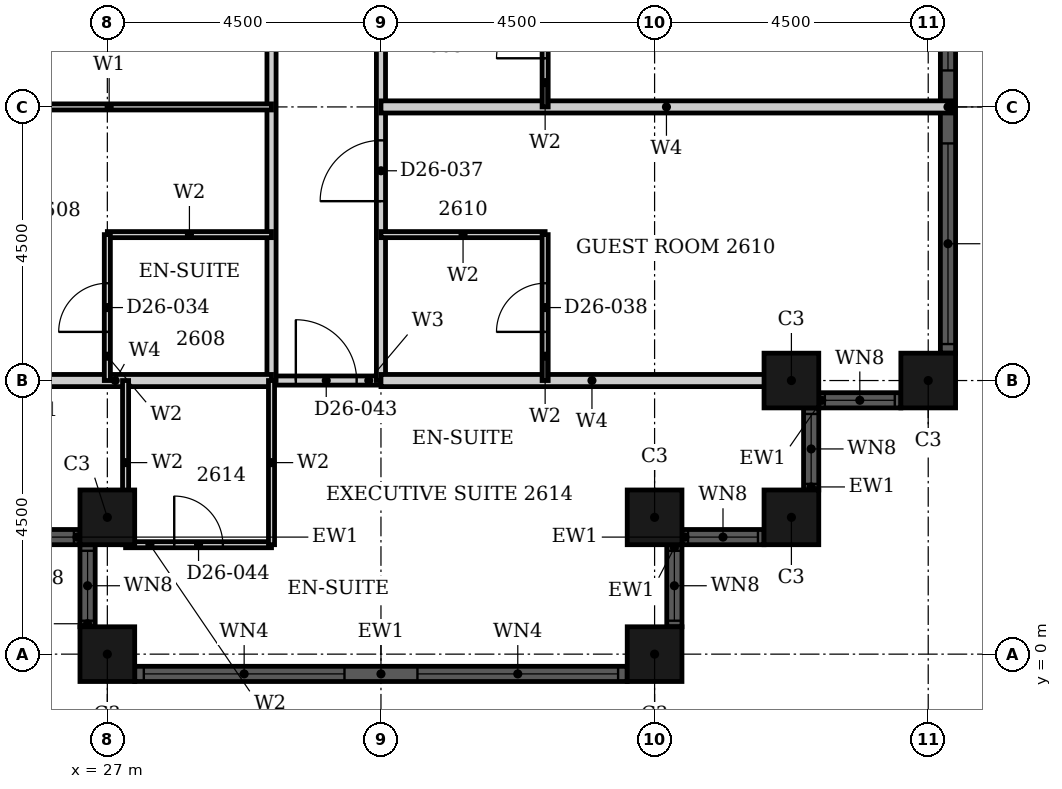
"""IFC4 building model, lengths in metres.
Left out: names, types, materials, properties, quantities, classifications, styles, units other than length and angle.
Written with IfcOpenShell. Run it as: python <this file> out.ifc"""

import sys

from ifc_helpers import new_model, si_unit, direction, frame, frame_2d, origin, origin_2d, place, context, subcontext, project, spatial, rectangle, hollow_rectangle, extrude, element, fill, save


model = new_model("IFC4")
c1 = context("Model", 3, precision=1e-05, world=origin(), true_north=direction((0.0, 1.0)))
c2 = subcontext(c1, "Body", "Model", "MODEL_VIEW")
j1 = project(units=[si_unit("LENGTHUNIT", "METRE"), si_unit("PLANEANGLEUNIT", "RADIAN")], contexts=[c1])
p1 = place(None, origin())
s1 = spatial("IfcSite", under=j1, at=p1, CompositionType="ELEMENT")
p2 = place(p1, origin())
s2 = spatial("IfcBuilding", under=s1, at=p2, CompositionType="ELEMENT")
p3 = place(p2, frame((0.0, 0.0, 108.0)))
s3 = spatial("IfcBuildingStorey", under=s2, at=p3, CompositionType="ELEMENT", Elevation=108.0)
for number, where, z_axis, x_axis in (
    (1, (27.0, 2.25, 0.0), (0.0, 0.0, 1.0), (1.0, 0.0, 0.0)),
    (2, (27.0, 0.0, 0.0), (0.0, 0.0, 1.0), (1.0, 0.0, 0.0)),
    (3, (36.0, 0.0, 0.0), (0.0, 0.0, 1.0), (1.0, 0.0, 0.0)),
    (4, (36.0, 2.25, 0.0), (0.0, 0.0, 1.0), (1.0, 0.0, 0.0)),
    (5, (38.25, 2.25, 0.0), (0.0, 0.0, 1.0), (1.0, 0.0, 0.0)),
    (6, (38.25, 4.5, 0.0), (0.0, 0.0, 1.0), (1.0, 0.0, 0.0)),
    (7, (40.5, 4.5, 0.0), (0.0, 0.0, 1.0), (1.0, 0.0, 0.0)),
):
    element("IfcColumn", number, at=place(p3, frame(where, z_axis=z_axis, x_axis=x_axis)), inside=s3, PredefinedType="COLUMN", context=c2, shape_type="SweptSolid", body=[
        extrude(hollow_rectangle(XDim=0.9, YDim=0.9, WallThickness=0.028, at=origin_2d()), origin(), (0.0, 0.0, 1.0), 3.6),
    ])
p4 = place(p3, frame((25.2, 1.925, 0.0), z_axis=(0.0, 0.0, 1.0), x_axis=(1.0, 0.0, 0.0)))
e8 = element("IfcWall", 8, at=p4, inside=s3, PredefinedType="SOLIDWALL", context=c2, shape_type="SweptSolid", body=[
    extrude(rectangle(XDim=1.35, YDim=0.25, at=frame_2d((0.675, 0.0))), origin(), (0.0, 0.0, 1.0), 3.6),
])
p5 = place(p4, frame((0.1, 0.0, 0.9)))
e9 = element("IfcOpeningElement", 9, at=p5, cuts=e8, PredefinedType="OPENING", context=c2, shape_type="SweptSolid", body=[
    extrude(rectangle(XDim=1.15, YDim=2.08, at=frame_2d((0.575, 1.04))), frame((0.0, 0.135, 0.0), z_axis=(0.0, -1.0, 0.0), x_axis=(1.0, 0.0, 0.0)), (0.0, 0.0, 1.0), 0.27),
])
p6 = place(p3, frame((26.675, 1.8, 0.0), z_axis=(0.0, 0.0, 1.0), x_axis=(0.0, -1.0, 0.0)))
e10 = element("IfcWall", 10, at=p6, inside=s3, PredefinedType="SOLIDWALL", context=c2, shape_type="SweptSolid", body=[
    extrude(rectangle(XDim=1.35, YDim=0.25, at=frame_2d((0.675, 0.0))), origin(), (0.0, 0.0, 1.0), 3.6),
])
p7 = place(p6, frame((0.1, 0.0, 0.9)))
e11 = element("IfcOpeningElement", 11, at=p7, cuts=e10, PredefinedType="OPENING", context=c2, shape_type="SweptSolid", body=[
    extrude(rectangle(XDim=1.15, YDim=2.08, at=frame_2d((0.575, 1.04))), frame((0.0, 0.135, 0.0), z_axis=(0.0, -1.0, 0.0), x_axis=(1.0, 0.0, 0.0)), (0.0, 0.0, 1.0), 0.27),
])
p8 = place(p3, frame((27.45, -0.325, 0.0), z_axis=(0.0, 0.0, 1.0), x_axis=(1.0, 0.0, 0.0)))
e12 = element("IfcWall", 12, at=p8, inside=s3, PredefinedType="SOLIDWALL", context=c2, shape_type="SweptSolid", body=[
    extrude(rectangle(XDim=8.1, YDim=0.25, at=frame_2d((4.05, 0.0))), origin(), (0.0, 0.0, 1.0), 3.6),
])
p9 = place(p8, frame((0.15, 0.0, 0.9)))
e13 = element("IfcOpeningElement", 13, at=p9, cuts=e12, PredefinedType="OPENING", context=c2, shape_type="SweptSolid", body=[
    extrude(rectangle(XDim=3.3, YDim=2.08, at=frame_2d((1.65, 1.04))), frame((0.0, 0.135, 0.0), z_axis=(0.0, -1.0, 0.0), x_axis=(1.0, 0.0, 0.0)), (0.0, 0.0, 1.0), 0.27),
])
p10 = place(p8, frame((4.65, 0.0, 0.9)))
e14 = element("IfcOpeningElement", 14, at=p10, cuts=e12, PredefinedType="OPENING", context=c2, shape_type="SweptSolid", body=[
    extrude(rectangle(XDim=3.3, YDim=2.08, at=frame_2d((1.65, 1.04))), frame((0.0, 0.135, 0.0), z_axis=(0.0, -1.0, 0.0), x_axis=(1.0, 0.0, 0.0)), (0.0, 0.0, 1.0), 0.27),
])
p11 = place(p3, frame((36.325, 0.45, 0.0), z_axis=(0.0, 0.0, 1.0), x_axis=(0.0, 1.0, 0.0)))
e15 = element("IfcWall", 15, at=p11, inside=s3, PredefinedType="SOLIDWALL", context=c2, shape_type="SweptSolid", body=[
    extrude(rectangle(XDim=1.35, YDim=0.25, at=frame_2d((0.675, 0.0))), origin(), (0.0, 0.0, 1.0), 3.6),
])
p12 = place(p11, frame((0.1, 0.0, 0.9)))
e16 = element("IfcOpeningElement", 16, at=p12, cuts=e15, PredefinedType="OPENING", context=c2, shape_type="SweptSolid", body=[
    extrude(rectangle(XDim=1.15, YDim=2.08, at=frame_2d((0.575, 1.04))), frame((0.0, 0.135, 0.0), z_axis=(0.0, -1.0, 0.0), x_axis=(1.0, 0.0, 0.0)), (0.0, 0.0, 1.0), 0.27),
])
p13 = place(p3, frame((36.45, 1.925, 0.0), z_axis=(0.0, 0.0, 1.0), x_axis=(1.0, 0.0, 0.0)))
e17 = element("IfcWall", 17, at=p13, inside=s3, PredefinedType="SOLIDWALL", context=c2, shape_type="SweptSolid", body=[
    extrude(rectangle(XDim=1.35, YDim=0.25, at=frame_2d((0.675, 0.0))), origin(), (0.0, 0.0, 1.0), 3.6),
])
p14 = place(p13, frame((0.1, 0.0, 0.9)))
e18 = element("IfcOpeningElement", 18, at=p14, cuts=e17, PredefinedType="OPENING", context=c2, shape_type="SweptSolid", body=[
    extrude(rectangle(XDim=1.15, YDim=2.08, at=frame_2d((0.575, 1.04))), frame((0.0, 0.135, 0.0), z_axis=(0.0, -1.0, 0.0), x_axis=(1.0, 0.0, 0.0)), (0.0, 0.0, 1.0), 0.27),
])
p15 = place(p3, frame((38.575, 2.7, 0.0), z_axis=(0.0, 0.0, 1.0), x_axis=(0.0, 1.0, 0.0)))
e19 = element("IfcWall", 19, at=p15, inside=s3, PredefinedType="SOLIDWALL", context=c2, shape_type="SweptSolid", body=[
    extrude(rectangle(XDim=1.35, YDim=0.25, at=frame_2d((0.675, 0.0))), origin(), (0.0, 0.0, 1.0), 3.6),
])
p16 = place(p15, frame((0.1, 0.0, 0.9)))
e20 = element("IfcOpeningElement", 20, at=p16, cuts=e19, PredefinedType="OPENING", context=c2, shape_type="SweptSolid", body=[
    extrude(rectangle(XDim=1.15, YDim=2.08, at=frame_2d((0.575, 1.04))), frame((0.0, 0.135, 0.0), z_axis=(0.0, -1.0, 0.0), x_axis=(1.0, 0.0, 0.0)), (0.0, 0.0, 1.0), 0.27),
])
p17 = place(p3, frame((38.7, 4.175, 0.0), z_axis=(0.0, 0.0, 1.0), x_axis=(1.0, 0.0, 0.0)))
e21 = element("IfcWall", 21, at=p17, inside=s3, PredefinedType="SOLIDWALL", context=c2, shape_type="SweptSolid", body=[
    extrude(rectangle(XDim=1.35, YDim=0.25, at=frame_2d((0.675, 0.0))), origin(), (0.0, 0.0, 1.0), 3.6),
])
p18 = place(p17, frame((0.1, 0.0, 0.9)))
e22 = element("IfcOpeningElement", 22, at=p18, cuts=e21, PredefinedType="OPENING", context=c2, shape_type="SweptSolid", body=[
    extrude(rectangle(XDim=1.15, YDim=2.08, at=frame_2d((0.575, 1.04))), frame((0.0, 0.135, 0.0), z_axis=(0.0, -1.0, 0.0), x_axis=(1.0, 0.0, 0.0)), (0.0, 0.0, 1.0), 0.27),
])
p19 = place(p3, frame((40.825, 4.95, 0.0), z_axis=(0.0, 0.0, 1.0), x_axis=(0.0, 1.0, 0.0)))
e23 = element("IfcWall", 23, at=p19, inside=s3, PredefinedType="SOLIDWALL", context=c2, shape_type="SweptSolid", body=[
    extrude(rectangle(XDim=8.1, YDim=0.25, at=frame_2d((4.05, 0.0))), origin(), (0.0, 0.0, 1.0), 3.6),
])
p20 = place(p19, frame((0.15, 0.0, 0.9)))
e24 = element("IfcOpeningElement", 24, at=p20, cuts=e23, PredefinedType="OPENING", context=c2, shape_type="SweptSolid", body=[
    extrude(rectangle(XDim=3.3, YDim=2.08, at=frame_2d((1.65, 1.04))), frame((0.0, 0.135, 0.0), z_axis=(0.0, -1.0, 0.0), x_axis=(1.0, 0.0, 0.0)), (0.0, 0.0, 1.0), 0.27),
])
p21 = place(p19, frame((4.65, 0.0, 0.9)))
e25 = element("IfcOpeningElement", 25, at=p21, cuts=e23, PredefinedType="OPENING", context=c2, shape_type="SweptSolid", body=[
    extrude(rectangle(XDim=3.3, YDim=2.08, at=frame_2d((1.65, 1.04))), frame((0.0, 0.135, 0.0), z_axis=(0.0, -1.0, 0.0), x_axis=(1.0, 0.0, 0.0)), (0.0, 0.0, 1.0), 0.27),
])
p22 = place(p3, frame((29.7, 4.5, 0.0), z_axis=(0.0, 0.0, 1.0), x_axis=(1.0, 0.0, 0.0)))
e26 = element("IfcWall", 26, at=p22, inside=s3, PredefinedType="PARTITIONING", context=c2, shape_type="SweptSolid", body=[
    extrude(rectangle(XDim=1.8, YDim=0.15, at=frame_2d((0.9, 0.0))), origin(), (0.0, 0.0, 1.0), 3.3),
])
p23 = place(p22, frame((0.4, 0.0, 0.0)))
e27 = element("IfcOpeningElement", 27, at=p23, cuts=e26, PredefinedType="OPENING", context=c2, shape_type="SweptSolid", body=[
    extrude(rectangle(XDim=1.0, YDim=2.1, at=frame_2d((0.5, 1.05))), frame((0.0, 0.085, 0.0), z_axis=(0.0, -1.0, 0.0), x_axis=(1.0, 0.0, 0.0)), (0.0, 0.0, 1.0), 0.17),
])
p24 = place(p3, frame((29.7, 4.5, 0.0), z_axis=(0.0, 0.0, 1.0), x_axis=(0.0, 1.0, 0.0)))
e28 = element("IfcWall", 28, at=p24, inside=s3, PredefinedType="PARTITIONING", context=c2, shape_type="SweptSolid", body=[
    extrude(rectangle(XDim=16.2, YDim=0.15, at=frame_2d((8.1, 0.0))), origin(), (0.0, 0.0, 1.0), 3.3),
])
p25 = place(p24, frame((6.25, 0.0, 0.0)))
e29 = element("IfcOpeningElement", 29, at=p25, cuts=e28, PredefinedType="OPENING", context=c2, shape_type="SweptSolid", body=[
    extrude(rectangle(XDim=1.0, YDim=2.1, at=frame_2d((0.5, 1.05))), frame((0.0, 0.085, 0.0), z_axis=(0.0, -1.0, 0.0), x_axis=(1.0, 0.0, 0.0)), (0.0, 0.0, 1.0), 0.17),
])
p26 = place(p3, frame((31.5, 4.5, 0.0), z_axis=(0.0, 0.0, 1.0), x_axis=(0.0, 1.0, 0.0)))
e30 = element("IfcWall", 30, at=p26, inside=s3, PredefinedType="PARTITIONING", context=c2, shape_type="SweptSolid", body=[
    extrude(rectangle(XDim=16.2, YDim=0.15, at=frame_2d((8.1, 0.0))), origin(), (0.0, 0.0, 1.0), 2.58),
])
p27 = place(p26, frame((7.45, 0.0, 0.0)))
e31 = element("IfcOpeningElement", 31, at=p27, cuts=e30, PredefinedType="OPENING", context=c2, shape_type="SweptSolid", body=[
    extrude(rectangle(XDim=1.0, YDim=2.1, at=frame_2d((0.5, 1.05))), frame((0.0, 0.085, 0.0), z_axis=(0.0, -1.0, 0.0), x_axis=(1.0, 0.0, 0.0)), (0.0, 0.0, 1.0), 0.17),
])
p28 = place(p26, frame((2.95, 0.0, 0.0)))
e32 = element("IfcOpeningElement", 32, at=p28, cuts=e30, PredefinedType="OPENING", context=c2, shape_type="SweptSolid", body=[
    extrude(rectangle(XDim=1.0, YDim=2.1, at=frame_2d((0.5, 1.05))), frame((0.0, 0.085, 0.0), z_axis=(0.0, -1.0, 0.0), x_axis=(1.0, 0.0, 0.0)), (0.0, 0.0, 1.0), 0.17),
])
p29 = place(p3, frame((22.11, 9.0, 0.0), z_axis=(0.0, 0.0, 1.0), x_axis=(1.0, 0.0, 0.0)))
e33 = element("IfcWall", 33, at=p29, inside=s3, PredefinedType="PARTITIONING", context=c2, shape_type="SweptSolid", body=[
    extrude(rectangle(XDim=7.59, YDim=0.1, at=frame_2d((3.795, 0.0))), origin(), (0.0, 0.0, 1.0), 3.3),
])
p30 = place(p29, frame((1.35, 0.0, 0.0)))
e34 = element("IfcOpeningElement", 34, at=p30, cuts=e33, PredefinedType="OPENING", context=c2, shape_type="SweptSolid", body=[
    extrude(rectangle(XDim=0.9, YDim=2.1, at=frame_2d((0.45, 1.05))), frame((0.0, 0.06, 0.0), z_axis=(0.0, -1.0, 0.0), x_axis=(1.0, 0.0, 0.0)), (0.0, 0.0, 1.0), 0.12),
])
p31 = place(p3, frame((31.5, 4.5, 0.0), z_axis=(0.0, 0.0, 1.0), x_axis=(1.0, 0.0, 0.0)))
e35 = element("IfcWall", 35, at=p31, inside=s3, PredefinedType="PARTITIONING", context=c2, shape_type="SweptSolid", body=[
    extrude(rectangle(XDim=6.94, YDim=0.2, at=frame_2d((3.47, 0.0))), origin(), (0.0, 0.0, 1.0), 3.3),
])
p32 = place(p3, frame((24.56, 4.5, 0.0), z_axis=(0.0, 0.0, 1.0), x_axis=(1.0, 0.0, 0.0)))
e36 = element("IfcWall", 36, at=p32, inside=s3, PredefinedType="PARTITIONING", context=c2, shape_type="SweptSolid", body=[
    extrude(rectangle(XDim=5.14, YDim=0.2, at=frame_2d((2.57, 0.0))), origin(), (0.0, 0.0, 1.0), 3.3),
])
p33 = place(p3, frame((31.5, 9.0, 0.0), z_axis=(0.0, 0.0, 1.0), x_axis=(1.0, 0.0, 0.0)))
e37 = element("IfcWall", 37, at=p33, inside=s3, PredefinedType="PARTITIONING", context=c2, shape_type="SweptSolid", body=[
    extrude(rectangle(XDim=9.39, YDim=0.2, at=frame_2d((4.695, 0.0))), origin(), (0.0, 0.0, 1.0), 3.3),
])
p34 = place(p3, frame((27.3, 1.8, 0.0), z_axis=(0.0, 0.0, 1.0), x_axis=(1.0, 0.0, 0.0)))
e38 = element("IfcWall", 38, at=p34, inside=s3, PredefinedType="PARTITIONING", context=c2, shape_type="SweptSolid", body=[
    extrude(rectangle(XDim=2.4, YDim=0.1, at=frame_2d((1.2, 0.0))), origin(), (0.0, 0.0, 1.0), 3.3),
])
p35 = place(p34, frame((0.8, 0.0, 0.0)))
e39 = element("IfcOpeningElement", 39, at=p35, cuts=e38, PredefinedType="OPENING", context=c2, shape_type="SweptSolid", body=[
    extrude(rectangle(XDim=0.8, YDim=2.1, at=frame_2d((0.4, 1.05))), frame((0.0, 0.06, 0.0), z_axis=(0.0, -1.0, 0.0), x_axis=(1.0, 0.0, 0.0)), (0.0, 0.0, 1.0), 0.12),
])
for number, where, z_axis, x_axis in (
    (40, (31.5, 6.9, 0.0), (0.0, 0.0, 1.0), (1.0, 0.0, 0.0)),
    (41, (27.0, 6.9, 0.0), (0.0, 0.0, 1.0), (1.0, 0.0, 0.0)),
):
    element("IfcWall", number, at=place(p3, frame(where, z_axis=z_axis, x_axis=x_axis)), inside=s3, PredefinedType="PARTITIONING", context=c2, shape_type="SweptSolid", body=[
        extrude(rectangle(XDim=2.7, YDim=0.1, at=frame_2d((1.35, 0.0))), origin(), (0.0, 0.0, 1.0), 3.3),
    ])
p36 = place(p3, frame((27.0, 4.5, 0.0), z_axis=(0.0, 0.0, 1.0), x_axis=(0.0, 1.0, 0.0)))
e42 = element("IfcWall", 42, at=p36, inside=s3, PredefinedType="PARTITIONING", context=c2, shape_type="SweptSolid", body=[
    extrude(rectangle(XDim=2.4, YDim=0.1, at=frame_2d((1.2, 0.0))), origin(), (0.0, 0.0, 1.0), 2.58),
])
p37 = place(p36, frame((0.8, 0.0, 0.0)))
e43 = element("IfcOpeningElement", 43, at=p37, cuts=e42, PredefinedType="OPENING", context=c2, shape_type="SweptSolid", body=[
    extrude(rectangle(XDim=0.8, YDim=2.1, at=frame_2d((0.4, 1.05))), frame((0.0, 0.06, 0.0), z_axis=(0.0, -1.0, 0.0), x_axis=(1.0, 0.0, 0.0)), (0.0, 0.0, 1.0), 0.12),
])
for number, where, z_axis, x_axis in (
    (44, (27.3, 1.8, 0.0), (0.0, 0.0, 1.0), (0.0, 1.0, 0.0)),
    (45, (29.7, 1.8, 0.0), (0.0, 0.0, 1.0), (0.0, 1.0, 0.0)),
):
    element("IfcWall", number, at=place(p3, frame(where, z_axis=z_axis, x_axis=x_axis)), inside=s3, PredefinedType="PARTITIONING", context=c2, shape_type="SweptSolid", body=[
        extrude(rectangle(XDim=2.7, YDim=0.1, at=frame_2d((1.35, 0.0))), origin(), (0.0, 0.0, 1.0), 3.3),
    ])
p38 = place(p3, frame((34.2, 9.0, 0.0), z_axis=(0.0, 0.0, 1.0), x_axis=(0.0, 1.0, 0.0)))
e46 = element("IfcWall", 46, at=p38, inside=s3, PredefinedType="PARTITIONING", context=c2, shape_type="SweptSolid", body=[
    extrude(rectangle(XDim=2.4, YDim=0.1, at=frame_2d((1.2, 0.0))), origin(), (0.0, 0.0, 1.0), 3.3),
])
p39 = place(p38, frame((0.8, 0.0, 0.0)))
e47 = element("IfcOpeningElement", 47, at=p39, cuts=e46, PredefinedType="OPENING", context=c2, shape_type="SweptSolid", body=[
    extrude(rectangle(XDim=0.8, YDim=2.1, at=frame_2d((0.4, 1.05))), frame((0.0, 0.06, 0.0), z_axis=(0.0, -1.0, 0.0), x_axis=(1.0, 0.0, 0.0)), (0.0, 0.0, 1.0), 0.12),
])
p40 = place(p3, frame((34.2, 4.5, 0.0), z_axis=(0.0, 0.0, 1.0), x_axis=(0.0, 1.0, 0.0)))
e48 = element("IfcWall", 48, at=p40, inside=s3, PredefinedType="PARTITIONING", context=c2, shape_type="SweptSolid", body=[
    extrude(rectangle(XDim=2.4, YDim=0.1, at=frame_2d((1.2, 0.0))), origin(), (0.0, 0.0, 1.0), 3.3),
])
p41 = place(p40, frame((0.8, 0.0, 0.0)))
e49 = element("IfcOpeningElement", 49, at=p41, cuts=e48, PredefinedType="OPENING", context=c2, shape_type="SweptSolid", body=[
    extrude(rectangle(XDim=0.8, YDim=2.1, at=frame_2d((0.4, 1.05))), frame((0.0, 0.06, 0.0), z_axis=(0.0, -1.0, 0.0), x_axis=(1.0, 0.0, 0.0)), (0.0, 0.0, 1.0), 0.12),
])
p42 = place(p5, origin())
e50 = element("IfcWindow", 50, at=p42, inside=s3, PartitioningType="SINGLE_PANEL", PredefinedType="WINDOW", context=c2, shape_type="SweptSolid", body=[
    extrude(rectangle(XDim=1.15, YDim=2.08, at=frame_2d((0.575, 1.04))), frame((0.0, 0.03, 0.0), z_axis=(0.0, -1.0, 0.0), x_axis=(1.0, 0.0, 0.0)), (0.0, 0.0, 1.0), 0.06),
])
fill(e9, e50)
p43 = place(p7, origin())
e51 = element("IfcWindow", 51, at=p43, inside=s3, PartitioningType="SINGLE_PANEL", PredefinedType="WINDOW", context=c2, shape_type="SweptSolid", body=[
    extrude(rectangle(XDim=1.15, YDim=2.08, at=frame_2d((0.575, 1.04))), frame((0.0, 0.03, 0.0), z_axis=(0.0, -1.0, 0.0), x_axis=(1.0, 0.0, 0.0)), (0.0, 0.0, 1.0), 0.06),
])
fill(e11, e51)
p44 = place(p9, origin())
e52 = element("IfcWindow", 52, at=p44, inside=s3, PartitioningType="SINGLE_PANEL", PredefinedType="WINDOW", context=c2, shape_type="SweptSolid", body=[
    extrude(rectangle(XDim=3.3, YDim=2.08, at=frame_2d((1.65, 1.04))), frame((0.0, 0.03, 0.0), z_axis=(0.0, -1.0, 0.0), x_axis=(1.0, 0.0, 0.0)), (0.0, 0.0, 1.0), 0.06),
])
fill(e13, e52)
p45 = place(p10, origin())
e53 = element("IfcWindow", 53, at=p45, inside=s3, PartitioningType="SINGLE_PANEL", PredefinedType="WINDOW", context=c2, shape_type="SweptSolid", body=[
    extrude(rectangle(XDim=3.3, YDim=2.08, at=frame_2d((1.65, 1.04))), frame((0.0, 0.03, 0.0), z_axis=(0.0, -1.0, 0.0), x_axis=(1.0, 0.0, 0.0)), (0.0, 0.0, 1.0), 0.06),
])
fill(e14, e53)
p46 = place(p12, origin())
e54 = element("IfcWindow", 54, at=p46, inside=s3, PartitioningType="SINGLE_PANEL", PredefinedType="WINDOW", context=c2, shape_type="SweptSolid", body=[
    extrude(rectangle(XDim=1.15, YDim=2.08, at=frame_2d((0.575, 1.04))), frame((0.0, 0.03, 0.0), z_axis=(0.0, -1.0, 0.0), x_axis=(1.0, 0.0, 0.0)), (0.0, 0.0, 1.0), 0.06),
])
fill(e16, e54)
p47 = place(p14, origin())
e55 = element("IfcWindow", 55, at=p47, inside=s3, PartitioningType="SINGLE_PANEL", PredefinedType="WINDOW", context=c2, shape_type="SweptSolid", body=[
    extrude(rectangle(XDim=1.15, YDim=2.08, at=frame_2d((0.575, 1.04))), frame((0.0, 0.03, 0.0), z_axis=(0.0, -1.0, 0.0), x_axis=(1.0, 0.0, 0.0)), (0.0, 0.0, 1.0), 0.06),
])
fill(e18, e55)
p48 = place(p16, origin())
e56 = element("IfcWindow", 56, at=p48, inside=s3, PartitioningType="SINGLE_PANEL", PredefinedType="WINDOW", context=c2, shape_type="SweptSolid", body=[
    extrude(rectangle(XDim=1.15, YDim=2.08, at=frame_2d((0.575, 1.04))), frame((0.0, 0.03, 0.0), z_axis=(0.0, -1.0, 0.0), x_axis=(1.0, 0.0, 0.0)), (0.0, 0.0, 1.0), 0.06),
])
fill(e20, e56)
p49 = place(p18, origin())
e57 = element("IfcWindow", 57, at=p49, inside=s3, PartitioningType="SINGLE_PANEL", PredefinedType="WINDOW", context=c2, shape_type="SweptSolid", body=[
    extrude(rectangle(XDim=1.15, YDim=2.08, at=frame_2d((0.575, 1.04))), frame((0.0, 0.03, 0.0), z_axis=(0.0, -1.0, 0.0), x_axis=(1.0, 0.0, 0.0)), (0.0, 0.0, 1.0), 0.06),
])
fill(e22, e57)
p50 = place(p20, origin())
e58 = element("IfcWindow", 58, at=p50, inside=s3, PartitioningType="SINGLE_PANEL", PredefinedType="WINDOW", context=c2, shape_type="SweptSolid", body=[
    extrude(rectangle(XDim=3.3, YDim=2.08, at=frame_2d((1.65, 1.04))), frame((0.0, 0.03, 0.0), z_axis=(0.0, -1.0, 0.0), x_axis=(1.0, 0.0, 0.0)), (0.0, 0.0, 1.0), 0.06),
])
fill(e24, e58)
p51 = place(p21, origin())
e59 = element("IfcWindow", 59, at=p51, inside=s3, PartitioningType="SINGLE_PANEL", PredefinedType="WINDOW", context=c2, shape_type="SweptSolid", body=[
    extrude(rectangle(XDim=3.3, YDim=2.08, at=frame_2d((1.65, 1.04))), frame((0.0, 0.03, 0.0), z_axis=(0.0, -1.0, 0.0), x_axis=(1.0, 0.0, 0.0)), (0.0, 0.0, 1.0), 0.06),
])
fill(e25, e59)
p52 = place(p37, origin())
e60 = element("IfcDoor", 60, at=p52, inside=s3, OperationType="SINGLE_SWING_LEFT", PredefinedType="DOOR", context=c2, shape_type="SweptSolid", body=[
    extrude(rectangle(XDim=0.8, YDim=2.1, at=frame_2d((0.4, 1.05))), frame((0.0, 0.025, 0.0), z_axis=(0.0, -1.0, 0.0), x_axis=(1.0, 0.0, 0.0)), (0.0, 0.0, 1.0), 0.05),
])
fill(e43, e60)
p53 = place(p39, origin())
e61 = element("IfcDoor", 61, at=p53, inside=s3, OperationType="SINGLE_SWING_RIGHT", PredefinedType="DOOR", context=c2, shape_type="SweptSolid", body=[
    extrude(rectangle(XDim=0.8, YDim=2.1, at=frame_2d((0.4, 1.05))), frame((0.0, 0.025, 0.0), z_axis=(0.0, -1.0, 0.0), x_axis=(1.0, 0.0, 0.0)), (0.0, 0.0, 1.0), 0.05),
])
fill(e47, e61)
p54 = place(p28, origin())
e62 = element("IfcDoor", 62, at=p54, inside=s3, OperationType="SINGLE_SWING_RIGHT", PredefinedType="DOOR", context=c2, shape_type="SweptSolid", body=[
    extrude(rectangle(XDim=1.0, YDim=2.1, at=frame_2d((0.5, 1.05))), frame((0.0, 0.025, 0.0), z_axis=(0.0, -1.0, 0.0), x_axis=(1.0, 0.0, 0.0)), (0.0, 0.0, 1.0), 0.05),
])
fill(e32, e62)
p55 = place(p41, origin())
e63 = element("IfcDoor", 63, at=p55, inside=s3, OperationType="SINGLE_SWING_LEFT", PredefinedType="DOOR", context=c2, shape_type="SweptSolid", body=[
    extrude(rectangle(XDim=0.8, YDim=2.1, at=frame_2d((0.4, 1.05))), frame((0.0, 0.025, 0.0), z_axis=(0.0, -1.0, 0.0), x_axis=(1.0, 0.0, 0.0)), (0.0, 0.0, 1.0), 0.05),
])
fill(e49, e63)
p56 = place(p23, origin())
e64 = element("IfcDoor", 64, at=p56, inside=s3, OperationType="SINGLE_SWING_RIGHT", PredefinedType="DOOR", context=c2, shape_type="SweptSolid", body=[
    extrude(rectangle(XDim=1.0, YDim=2.1, at=frame_2d((0.5, 1.05))), frame((0.0, 0.025, 0.0), z_axis=(0.0, -1.0, 0.0), x_axis=(1.0, 0.0, 0.0)), (0.0, 0.0, 1.0), 0.05),
])
fill(e27, e64)
p57 = place(p35, origin())
e65 = element("IfcDoor", 65, at=p57, inside=s3, OperationType="SINGLE_SWING_RIGHT", PredefinedType="DOOR", context=c2, shape_type="SweptSolid", body=[
    extrude(rectangle(XDim=0.8, YDim=2.1, at=frame_2d((0.4, 1.05))), frame((0.0, 0.025, 0.0), z_axis=(0.0, -1.0, 0.0), x_axis=(1.0, 0.0, 0.0)), (0.0, 0.0, 1.0), 0.05),
])
fill(e39, e65)
save(model, sys.argv[1])
